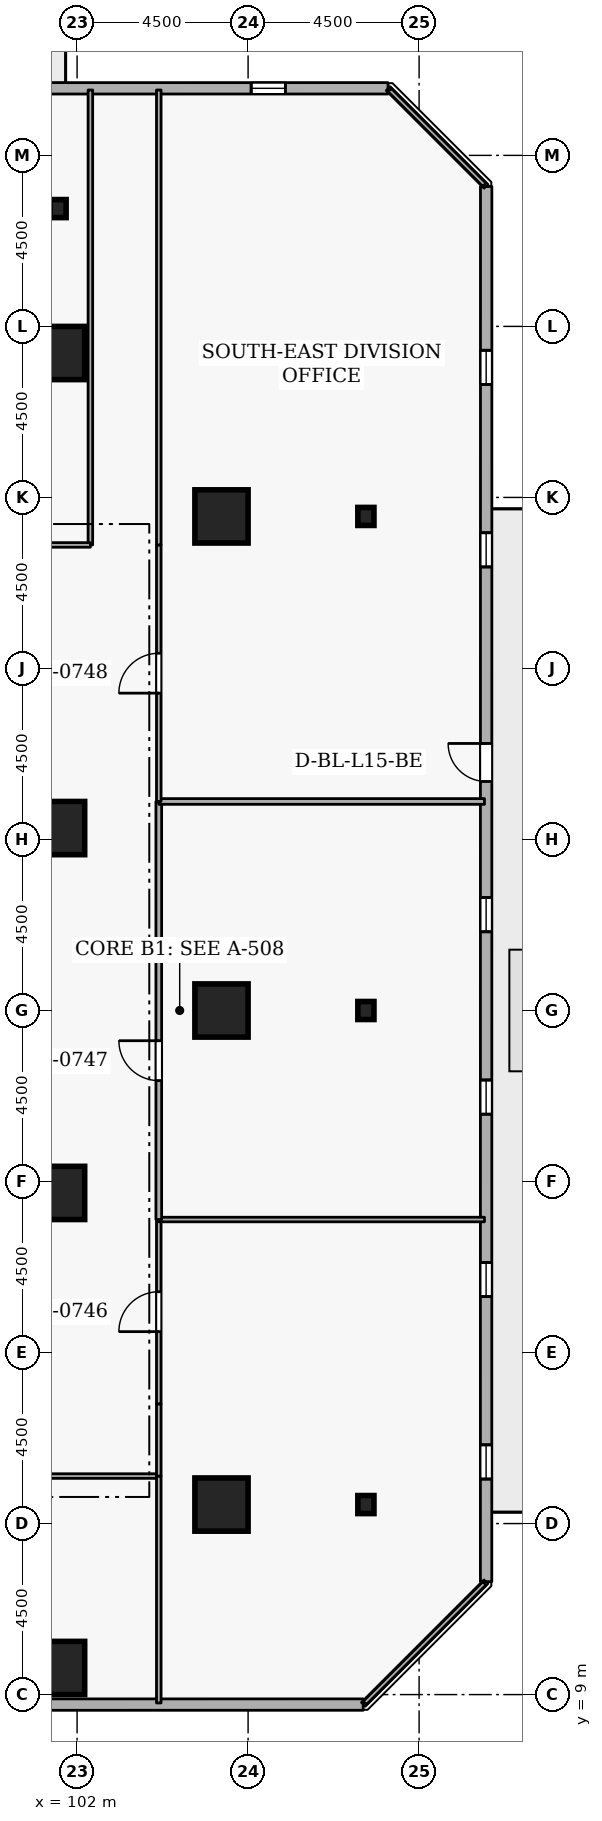
"""IFC4 building model, lengths in metres.
Left out: names, types, materials, properties, quantities, classifications, styles, units other than length and angle.
Written with IfcOpenShell. Run it as: python <this file> out.ifc"""

import sys

from ifc_helpers import new_model, si_unit, direction, frame, frame_2d, origin, origin_2d, place, context, subcontext, project, spatial, rectangle, i_section, extrude, element, fill, save


model = new_model("IFC4")
c1 = context("Model", 3, precision=1e-05, world=origin(), true_north=direction((0.0, 1.0)))
c2 = subcontext(c1, "Body", "Model", "MODEL_VIEW")
j1 = project(units=[si_unit("LENGTHUNIT", "METRE"), si_unit("PLANEANGLEUNIT", "RADIAN")], contexts=[c1])
p1 = place(None, origin())
s1 = spatial("IfcSite", under=j1, at=p1, CompositionType="ELEMENT")
p2 = place(p1, origin())
s2 = spatial("IfcBuilding", under=s1, at=p2, CompositionType="ELEMENT")
p3 = place(p2, frame((0.0, 0.0, 60.9)))
s3 = spatial("IfcBuildingStorey", under=s2, at=p3, CompositionType="ELEMENT", Elevation=60.9)
for number, where, z_axis, x_axis in (
    (1, (105.8, 14.0, 0.0), (0.0, 0.0, 1.0), (1.0, 0.0, 0.0)),
    (2, (105.8, 27.0, 0.0), (0.0, 0.0, 1.0), (1.0, 0.0, 0.0)),
    (3, (105.8, 40.0, 0.0), (0.0, 0.0, 1.0), (1.0, 0.0, 0.0)),
    (4, (101.5, 44.3, 0.0), (0.0, 0.0, 1.0), (1.0, 0.0, 0.0)),
    (5, (101.5, 9.7, 0.0), (0.0, 0.0, 1.0), (1.0, 0.0, 0.0)),
    (6, (101.5, 22.2, 0.0), (0.0, 0.0, 1.0), (1.0, 0.0, 0.0)),
    (7, (101.5, 31.8, 0.0), (0.0, 0.0, 1.0), (1.0, 0.0, 0.0)),
):
    element("IfcColumn", number, at=place(p3, frame(where, z_axis=z_axis, x_axis=x_axis)), inside=s3, PredefinedType="COLUMN", context=c2, shape_type="SweptSolid", body=[
        extrude(rectangle(XDim=1.4, YDim=1.4, at=origin_2d()), origin(), (0.0, 0.0, 1.0), 3.6),
    ])
for number, where, z_axis, x_axis in (
    (8, (109.6, 14.0, 0.0), (0.0, 0.0, 1.0), (1.0, 0.0, 0.0)),
    (9, (109.6, 27.0, 0.0), (0.0, 0.0, 1.0), (1.0, 0.0, 0.0)),
    (10, (109.6, 40.0, 0.0), (0.0, 0.0, 1.0), (1.0, 0.0, 0.0)),
    (11, (101.5, 48.1, 0.0), (0.0, 0.0, 1.0), (1.0, 0.0, 0.0)),
):
    element("IfcColumn", number, at=place(p3, frame(where, z_axis=z_axis, x_axis=x_axis)), inside=s3, PredefinedType="COLUMN", context=c2, shape_type="SweptSolid", body=[
        extrude(i_section(OverallWidth=0.424, OverallDepth=0.475, WebThickness=0.048, FlangeThickness=0.077, FilletRadius=0.015, at=origin_2d()), origin(), (0.0, 0.0, 1.0), 3.6),
    ])
p4 = place(p3, frame((72.819, 8.735, 0.0), z_axis=(0.0, 0.0, 1.0), x_axis=(0.999999998209, 5.985515e-05, 0.0)))
e12 = element("IfcWall", 12, at=p4, inside=s3, PredefinedType="STANDARD", context=c2, shape_type="SweptSolid", body=[
    extrude(rectangle(XDim=36.71, YDim=0.3, at=frame_2d((18.355, 0.0))), origin(), (0.0, 0.0, 1.0), 2.7),
])
p5 = place(p4, frame((7.5, 0.0, 0.72)))
e13 = element("IfcOpeningElement", 13, at=p5, cuts=e12, PredefinedType="OPENING", context=c2, shape_type="SweptSolid", body=[
    extrude(rectangle(XDim=0.9, YDim=1.75, at=frame_2d((0.45, 0.875))), frame((0.0, 0.16, 0.0), z_axis=(0.0, -1.0, 0.0), x_axis=(1.0, 0.0, 0.0)), (0.0, 0.0, 1.0), 0.32),
])
p6 = place(p4, frame((17.1, 0.0, 0.72)))
e14 = element("IfcOpeningElement", 14, at=p6, cuts=e12, PredefinedType="OPENING", context=c2, shape_type="SweptSolid", body=[
    extrude(rectangle(XDim=0.9, YDim=1.75, at=frame_2d((0.45, 0.875))), frame((0.0, 0.16, 0.0), z_axis=(0.0, -1.0, 0.0), x_axis=(1.0, 0.0, 0.0)), (0.0, 0.0, 1.0), 0.32),
])
p7 = place(p4, frame((21.9, 0.0, 0.72)))
e15 = element("IfcOpeningElement", 15, at=p7, cuts=e12, PredefinedType="OPENING", context=c2, shape_type="SweptSolid", body=[
    extrude(rectangle(XDim=0.9, YDim=1.75, at=frame_2d((0.45, 0.875))), frame((0.0, 0.16, 0.0), z_axis=(0.0, -1.0, 0.0), x_axis=(1.0, 0.0, 0.0)), (0.0, 0.0, 1.0), 0.32),
])
p8 = place(p4, frame((26.7, 0.0, 0.72)))
e16 = element("IfcOpeningElement", 16, at=p8, cuts=e12, PredefinedType="OPENING", context=c2, shape_type="SweptSolid", body=[
    extrude(rectangle(XDim=0.9, YDim=1.75, at=frame_2d((0.45, 0.875))), frame((0.0, 0.16, 0.0), z_axis=(0.0, -1.0, 0.0), x_axis=(1.0, 0.0, 0.0)), (0.0, 0.0, 1.0), 0.32),
])
p9 = place(p3, frame((112.763, 11.971, 0.0), z_axis=(0.0, 0.0, 1.0), x_axis=(5.985515e-05, 0.999999998209, 0.0)))
e17 = element("IfcWall", 17, at=p9, inside=s3, PredefinedType="STANDARD", context=c2, shape_type="SweptSolid", body=[
    extrude(rectangle(XDim=36.71, YDim=0.3, at=frame_2d((18.355, 0.0))), origin(), (0.0, 0.0, 1.0), 2.7),
])
p10 = place(p9, frame((21.055, 0.0, 0.0)))
e18 = element("IfcOpeningElement", 18, at=p10, cuts=e17, PredefinedType="OPENING", context=c2, shape_type="SweptSolid", body=[
    extrude(rectangle(XDim=1.0, YDim=2.08, at=frame_2d((0.5, 1.04))), frame((0.0, 0.16, 0.0), z_axis=(0.0, -1.0, 0.0), x_axis=(1.0, 0.0, 0.0)), (0.0, 0.0, 1.0), 0.32),
])
p11 = place(p9, frame((2.7, 0.0, 0.72)))
e19 = element("IfcOpeningElement", 19, at=p11, cuts=e17, PredefinedType="OPENING", context=c2, shape_type="SweptSolid", body=[
    extrude(rectangle(XDim=0.9, YDim=1.75, at=frame_2d((0.45, 0.875))), frame((0.0, 0.16, 0.0), z_axis=(0.0, -1.0, 0.0), x_axis=(1.0, 0.0, 0.0)), (0.0, 0.0, 1.0), 0.32),
])
p12 = place(p9, frame((7.5, 0.0, 0.72)))
e20 = element("IfcOpeningElement", 20, at=p12, cuts=e17, PredefinedType="OPENING", context=c2, shape_type="SweptSolid", body=[
    extrude(rectangle(XDim=0.9, YDim=1.75, at=frame_2d((0.45, 0.875))), frame((0.0, 0.16, 0.0), z_axis=(0.0, -1.0, 0.0), x_axis=(1.0, 0.0, 0.0)), (0.0, 0.0, 1.0), 0.32),
])
p13 = place(p9, frame((12.3, 0.0, 0.72)))
e21 = element("IfcOpeningElement", 21, at=p13, cuts=e17, PredefinedType="OPENING", context=c2, shape_type="SweptSolid", body=[
    extrude(rectangle(XDim=0.9, YDim=1.75, at=frame_2d((0.45, 0.875))), frame((0.0, 0.16, 0.0), z_axis=(0.0, -1.0, 0.0), x_axis=(1.0, 0.0, 0.0)), (0.0, 0.0, 1.0), 0.32),
])
p14 = place(p9, frame((17.1, 0.0, 0.72)))
e22 = element("IfcOpeningElement", 22, at=p14, cuts=e17, PredefinedType="OPENING", context=c2, shape_type="SweptSolid", body=[
    extrude(rectangle(XDim=0.9, YDim=1.75, at=frame_2d((0.45, 0.875))), frame((0.0, 0.16, 0.0), z_axis=(0.0, -1.0, 0.0), x_axis=(1.0, 0.0, 0.0)), (0.0, 0.0, 1.0), 0.32),
])
p15 = place(p9, frame((26.7, 0.0, 0.72)))
e23 = element("IfcOpeningElement", 23, at=p15, cuts=e17, PredefinedType="OPENING", context=c2, shape_type="SweptSolid", body=[
    extrude(rectangle(XDim=0.9, YDim=1.75, at=frame_2d((0.45, 0.875))), frame((0.0, 0.16, 0.0), z_axis=(0.0, -1.0, 0.0), x_axis=(1.0, 0.0, 0.0)), (0.0, 0.0, 1.0), 0.32),
])
p16 = place(p9, frame((31.5, 0.0, 0.72)))
e24 = element("IfcOpeningElement", 24, at=p16, cuts=e17, PredefinedType="OPENING", context=c2, shape_type="SweptSolid", body=[
    extrude(rectangle(XDim=0.9, YDim=1.75, at=frame_2d((0.45, 0.875))), frame((0.0, 0.16, 0.0), z_axis=(0.0, -1.0, 0.0), x_axis=(1.0, 0.0, 0.0)), (0.0, 0.0, 1.0), 0.32),
])
p17 = place(p3, frame((110.181, 51.265, 0.0), z_axis=(0.0, 0.0, 1.0), x_axis=(-0.999999998209, -5.985515e-05, 0.0)))
e25 = element("IfcWall", 25, at=p17, inside=s3, PredefinedType="STANDARD", context=c2, shape_type="SweptSolid", body=[
    extrude(rectangle(XDim=36.71, YDim=0.3, at=frame_2d((18.355, 0.0))), origin(), (0.0, 0.0, 1.0), 2.7),
])
p18 = place(p17, frame((20.155, 0.0, 0.0)))
e26 = element("IfcOpeningElement", 26, at=p18, cuts=e25, PredefinedType="OPENING", context=c2, shape_type="SweptSolid", body=[
    extrude(rectangle(XDim=1.0, YDim=2.08, at=frame_2d((0.5, 1.04))), frame((0.0, 0.16, 0.0), z_axis=(0.0, -1.0, 0.0), x_axis=(1.0, 0.0, 0.0)), (0.0, 0.0, 1.0), 0.32),
])
p19 = place(p17, frame((2.7, 0.0, 0.72)))
e27 = element("IfcOpeningElement", 27, at=p19, cuts=e25, PredefinedType="OPENING", context=c2, shape_type="SweptSolid", body=[
    extrude(rectangle(XDim=0.9, YDim=1.75, at=frame_2d((0.45, 0.875))), frame((0.0, 0.16, 0.0), z_axis=(0.0, -1.0, 0.0), x_axis=(1.0, 0.0, 0.0)), (0.0, 0.0, 1.0), 0.32),
])
p20 = place(p17, frame((12.3, 0.0, 0.72)))
e28 = element("IfcOpeningElement", 28, at=p20, cuts=e25, PredefinedType="OPENING", context=c2, shape_type="SweptSolid", body=[
    extrude(rectangle(XDim=0.9, YDim=1.75, at=frame_2d((0.45, 0.875))), frame((0.0, 0.16, 0.0), z_axis=(0.0, -1.0, 0.0), x_axis=(1.0, 0.0, 0.0)), (0.0, 0.0, 1.0), 0.32),
])
p21 = place(p17, frame((17.1, 0.0, 0.72)))
e29 = element("IfcOpeningElement", 29, at=p21, cuts=e25, PredefinedType="OPENING", context=c2, shape_type="SweptSolid", body=[
    extrude(rectangle(XDim=0.9, YDim=1.75, at=frame_2d((0.45, 0.875))), frame((0.0, 0.16, 0.0), z_axis=(0.0, -1.0, 0.0), x_axis=(1.0, 0.0, 0.0)), (0.0, 0.0, 1.0), 0.32),
])
p22 = place(p17, frame((26.7, 0.0, 0.72)))
e30 = element("IfcOpeningElement", 30, at=p22, cuts=e25, PredefinedType="OPENING", context=c2, shape_type="SweptSolid", body=[
    extrude(rectangle(XDim=0.9, YDim=1.75, at=frame_2d((0.45, 0.875))), frame((0.0, 0.16, 0.0), z_axis=(0.0, -1.0, 0.0), x_axis=(1.0, 0.0, 0.0)), (0.0, 0.0, 1.0), 0.32),
])
p23 = place(p17, frame((31.5, 0.0, 0.72)))
e31 = element("IfcOpeningElement", 31, at=p23, cuts=e25, PredefinedType="OPENING", context=c2, shape_type="SweptSolid", body=[
    extrude(rectangle(XDim=0.9, YDim=1.75, at=frame_2d((0.45, 0.875))), frame((0.0, 0.16, 0.0), z_axis=(0.0, -1.0, 0.0), x_axis=(1.0, 0.0, 0.0)), (0.0, 0.0, 1.0), 0.32),
])
p24 = place(p3, frame((94.8, 14.75, 0.0), z_axis=(0.0, 0.0, 1.0), x_axis=(1.0, 0.0, 0.0)))
e32 = element("IfcWall", 32, at=p24, inside=s3, PredefinedType="PARTITIONING", context=c2, shape_type="SweptSolid", body=[
    extrude(rectangle(XDim=9.35, YDim=0.12, at=frame_2d((4.675, 0.0))), origin(), (0.0, 0.0, 1.0), 3.34),
])
p25 = place(p24, frame((4.15, 0.0, 0.0)))
e33 = element("IfcOpeningElement", 33, at=p25, cuts=e32, PredefinedType="OPENING", context=c2, shape_type="SweptSolid", body=[
    extrude(rectangle(XDim=1.05, YDim=2.1, at=frame_2d((0.525, 1.05))), frame((0.0, 0.07, 0.0), z_axis=(0.0, -1.0, 0.0), x_axis=(1.0, 0.0, 0.0)), (0.0, 0.0, 1.0), 0.14),
])
p26 = place(p3, frame((104.15, 14.75, 0.0), z_axis=(0.0, 0.0, 1.0), x_axis=(0.0, -1.0, 0.0)))
e34 = element("IfcWall", 34, at=p26, inside=s3, PredefinedType="PARTITIONING", context=c2, shape_type="SweptSolid", body=[
    extrude(rectangle(XDim=5.97, YDim=0.12, at=frame_2d((2.985, 0.0))), origin(), (0.0, 0.0, 1.0), 3.34),
])
p27 = place(p3, frame((102.35, 51.22, 0.0), z_axis=(0.0, 0.0, 1.0), x_axis=(0.0, -1.0, 0.0)))
e35 = element("IfcWall", 35, at=p27, inside=s3, PredefinedType="PARTITIONING", context=c2, shape_type="SweptSolid", body=[
    extrude(rectangle(XDim=11.97, YDim=0.12, at=frame_2d((5.985, 0.0))), origin(), (0.0, 0.0, 1.0), 3.34),
])
p28 = place(p3, frame((102.35, 39.25, 0.0), z_axis=(0.0, 0.0, 1.0), x_axis=(-1.0, 0.0, 0.0)))
e36 = element("IfcWall", 36, at=p28, inside=s3, PredefinedType="PARTITIONING", context=c2, shape_type="SweptSolid", body=[
    extrude(rectangle(XDim=1.862, YDim=0.12, at=frame_2d((0.931, 0.0))), origin(), (0.0, 0.0, 1.0), 3.34),
])
p29 = place(p3, frame((104.15, 14.75, 0.0), z_axis=(0.0, 0.0, 1.0), x_axis=(0.0, 1.0, 0.0)))
e37 = element("IfcWall", 37, at=p29, inside=s3, PredefinedType="PARTITIONING", context=c2, shape_type="SweptSolid", body=[
    extrude(rectangle(XDim=1.9, YDim=0.12, at=frame_2d((0.95, 0.0))), origin(), (0.0, 0.0, 1.0), 3.34),
])
p30 = place(p3, frame((104.15, 16.65, 0.0), z_axis=(0.0, 0.0, 1.0), x_axis=(0.0, 1.0, 0.0)))
e38 = element("IfcWall", 38, at=p30, inside=s3, PredefinedType="PARTITIONING", context=c2, shape_type="SweptSolid", body=[
    extrude(rectangle(XDim=4.85, YDim=0.12, at=frame_2d((2.425, 0.0))), origin(), (0.0, 0.0, 1.0), 3.34),
])
p31 = place(p30, frame((1.9, 0.0, 0.0)))
e39 = element("IfcOpeningElement", 39, at=p31, cuts=e38, PredefinedType="OPENING", context=c2, shape_type="SweptSolid", body=[
    extrude(rectangle(XDim=1.05, YDim=2.1, at=frame_2d((0.525, 1.05))), frame((0.0, 0.07, 0.0), z_axis=(0.0, -1.0, 0.0), x_axis=(1.0, 0.0, 0.0)), (0.0, 0.0, 1.0), 0.14),
])
p32 = place(p3, frame((104.15, 21.5, 0.0), z_axis=(0.0, 0.0, 1.0), x_axis=(1.0, 0.0, 0.0)))
e40 = element("IfcWall", 40, at=p32, inside=s3, PredefinedType="PARTITIONING", context=c2, shape_type="SweptSolid", body=[
    extrude(rectangle(XDim=8.57, YDim=0.12, at=frame_2d((4.285, 0.0))), origin(), (0.0, 0.0, 1.0), 3.34),
])
p33 = place(p3, frame((112.72, 11.93, 0.0), z_axis=(0.0, 0.0, 1.0), x_axis=(-0.707106781187, -0.707106781187, 0.0)))
e41 = element("IfcWall", 41, at=p33, inside=s3, PredefinedType="PARTITIONING", context=c2, shape_type="SweptSolid", body=[
    extrude(rectangle(XDim=4.454, YDim=0.12, at=frame_2d((2.227, 0.0))), origin(), (0.0, 0.0, 1.0), 3.34),
])
p34 = place(p3, frame((104.15, 21.5, 0.0), z_axis=(0.0, 0.0, 1.0), x_axis=(0.0, 1.0, 0.0)))
e42 = element("IfcWall", 42, at=p34, inside=s3, PredefinedType="PARTITIONING", context=c2, shape_type="SweptSolid", body=[
    extrude(rectangle(XDim=11.0, YDim=0.15, at=frame_2d((5.5, 0.0))), origin(), (0.0, 0.0, 1.0), 3.34),
])
p35 = place(p34, frame((3.655, 0.0, 0.0)))
e43 = element("IfcOpeningElement", 43, at=p35, cuts=e42, PredefinedType="OPENING", context=c2, shape_type="SweptSolid", body=[
    extrude(rectangle(XDim=1.05, YDim=2.1, at=frame_2d((0.525, 1.05))), frame((0.0, 0.085, 0.0), z_axis=(0.0, -1.0, 0.0), x_axis=(1.0, 0.0, 0.0)), (0.0, 0.0, 1.0), 0.17),
])
p36 = place(p3, frame((104.15, 32.5, 0.0), z_axis=(0.0, 0.0, 1.0), x_axis=(1.0, 0.0, 0.0)))
e44 = element("IfcWall", 44, at=p36, inside=s3, PredefinedType="PARTITIONING", context=c2, shape_type="SweptSolid", body=[
    extrude(rectangle(XDim=8.57, YDim=0.15, at=frame_2d((4.285, 0.0))), origin(), (0.0, 0.0, 1.0), 3.34),
])
p37 = place(p3, frame((104.15, 32.5, 0.0), z_axis=(0.0, 0.0, 1.0), x_axis=(0.0, 1.0, 0.0)))
e45 = element("IfcWall", 45, at=p37, inside=s3, PredefinedType="PARTITIONING", context=c2, shape_type="SweptSolid", body=[
    extrude(rectangle(XDim=6.75, YDim=0.12, at=frame_2d((3.375, 0.0))), origin(), (0.0, 0.0, 1.0), 3.34),
])
p38 = place(p37, frame((2.85, 0.0, 0.0)))
e46 = element("IfcOpeningElement", 46, at=p38, cuts=e45, PredefinedType="OPENING", context=c2, shape_type="SweptSolid", body=[
    extrude(rectangle(XDim=1.05, YDim=2.1, at=frame_2d((0.525, 1.05))), frame((0.0, 0.07, 0.0), z_axis=(0.0, -1.0, 0.0), x_axis=(1.0, 0.0, 0.0)), (0.0, 0.0, 1.0), 0.14),
])
p39 = place(p3, frame((104.15, 39.25, 0.0), z_axis=(0.0, 0.0, 1.0), x_axis=(0.0, 1.0, 0.0)))
e47 = element("IfcWall", 47, at=p39, inside=s3, PredefinedType="PARTITIONING", context=c2, shape_type="SweptSolid", body=[
    extrude(rectangle(XDim=11.97, YDim=0.12, at=frame_2d((5.985, 0.0))), origin(), (0.0, 0.0, 1.0), 3.34),
])
p40 = place(p3, frame((110.225, 51.22, 0.0), z_axis=(0.0, 0.0, 1.0), x_axis=(0.707106781187, -0.707106781187, 0.0)))
e48 = element("IfcWall", 48, at=p40, inside=s3, PredefinedType="PARTITIONING", context=c2, shape_type="SweptSolid", body=[
    extrude(rectangle(XDim=3.528, YDim=0.12, at=frame_2d((1.764, 0.0))), origin(), (0.0, 0.0, 1.0), 3.34),
])
p41 = place(p10, origin())
e49 = element("IfcDoor", 49, at=p41, inside=s3, OperationType="SINGLE_SWING_RIGHT", PredefinedType="DOOR", context=c2, shape_type="SweptSolid", body=[
    extrude(rectangle(XDim=1.0, YDim=2.08, at=frame_2d((0.5, 1.04))), frame((0.0, 0.025, 0.0), z_axis=(0.0, -1.0, 0.0), x_axis=(1.0, 0.0, 0.0)), (0.0, 0.0, 1.0), 0.05),
])
fill(e18, e49)
p42 = place(p11, origin())
e50 = element("IfcWindow", 50, at=p42, inside=s3, PartitioningType="SINGLE_PANEL", PredefinedType="WINDOW", context=c2, shape_type="SweptSolid", body=[
    extrude(rectangle(XDim=0.9, YDim=1.75, at=frame_2d((0.45, 0.875))), frame((0.0, 0.03, 0.0), z_axis=(0.0, -1.0, 0.0), x_axis=(1.0, 0.0, 0.0)), (0.0, 0.0, 1.0), 0.06),
])
fill(e19, e50)
p43 = place(p12, origin())
e51 = element("IfcWindow", 51, at=p43, inside=s3, PartitioningType="SINGLE_PANEL", PredefinedType="WINDOW", context=c2, shape_type="SweptSolid", body=[
    extrude(rectangle(XDim=0.9, YDim=1.75, at=frame_2d((0.45, 0.875))), frame((0.0, 0.03, 0.0), z_axis=(0.0, -1.0, 0.0), x_axis=(1.0, 0.0, 0.0)), (0.0, 0.0, 1.0), 0.06),
])
fill(e20, e51)
p44 = place(p13, origin())
e52 = element("IfcWindow", 52, at=p44, inside=s3, PartitioningType="SINGLE_PANEL", PredefinedType="WINDOW", context=c2, shape_type="SweptSolid", body=[
    extrude(rectangle(XDim=0.9, YDim=1.75, at=frame_2d((0.45, 0.875))), frame((0.0, 0.03, 0.0), z_axis=(0.0, -1.0, 0.0), x_axis=(1.0, 0.0, 0.0)), (0.0, 0.0, 1.0), 0.06),
])
fill(e21, e52)
p45 = place(p14, origin())
e53 = element("IfcWindow", 53, at=p45, inside=s3, PartitioningType="SINGLE_PANEL", PredefinedType="WINDOW", context=c2, shape_type="SweptSolid", body=[
    extrude(rectangle(XDim=0.9, YDim=1.75, at=frame_2d((0.45, 0.875))), frame((0.0, 0.03, 0.0), z_axis=(0.0, -1.0, 0.0), x_axis=(1.0, 0.0, 0.0)), (0.0, 0.0, 1.0), 0.06),
])
fill(e22, e53)
p46 = place(p15, origin())
e54 = element("IfcWindow", 54, at=p46, inside=s3, PartitioningType="SINGLE_PANEL", PredefinedType="WINDOW", context=c2, shape_type="SweptSolid", body=[
    extrude(rectangle(XDim=0.9, YDim=1.75, at=frame_2d((0.45, 0.875))), frame((0.0, 0.03, 0.0), z_axis=(0.0, -1.0, 0.0), x_axis=(1.0, 0.0, 0.0)), (0.0, 0.0, 1.0), 0.06),
])
fill(e23, e54)
p47 = place(p16, origin())
e55 = element("IfcWindow", 55, at=p47, inside=s3, PartitioningType="SINGLE_PANEL", PredefinedType="WINDOW", context=c2, shape_type="SweptSolid", body=[
    extrude(rectangle(XDim=0.9, YDim=1.75, at=frame_2d((0.45, 0.875))), frame((0.0, 0.03, 0.0), z_axis=(0.0, -1.0, 0.0), x_axis=(1.0, 0.0, 0.0)), (0.0, 0.0, 1.0), 0.06),
])
fill(e24, e55)
p48 = place(p19, origin())
e56 = element("IfcWindow", 56, at=p48, inside=s3, PartitioningType="SINGLE_PANEL", PredefinedType="WINDOW", context=c2, shape_type="SweptSolid", body=[
    extrude(rectangle(XDim=0.9, YDim=1.75, at=frame_2d((0.45, 0.875))), frame((0.0, 0.03, 0.0), z_axis=(0.0, -1.0, 0.0), x_axis=(1.0, 0.0, 0.0)), (0.0, 0.0, 1.0), 0.06),
])
fill(e27, e56)
p49 = place(p31, origin())
e57 = element("IfcDoor", 57, at=p49, inside=s3, OperationType="SINGLE_SWING_LEFT", PredefinedType="DOOR", context=c2, shape_type="SweptSolid", body=[
    extrude(rectangle(XDim=1.05, YDim=2.1, at=frame_2d((0.525, 1.05))), frame((0.0, 0.025, 0.0), z_axis=(0.0, -1.0, 0.0), x_axis=(1.0, 0.0, 0.0)), (0.0, 0.0, 1.0), 0.05),
])
fill(e39, e57)
p50 = place(p35, origin())
e58 = element("IfcDoor", 58, at=p50, inside=s3, OperationType="SINGLE_SWING_RIGHT", PredefinedType="DOOR", context=c2, shape_type="SweptSolid", body=[
    extrude(rectangle(XDim=1.05, YDim=2.1, at=frame_2d((0.525, 1.05))), frame((0.0, 0.025, 0.0), z_axis=(0.0, -1.0, 0.0), x_axis=(1.0, 0.0, 0.0)), (0.0, 0.0, 1.0), 0.05),
])
fill(e43, e58)
p51 = place(p38, origin())
e59 = element("IfcDoor", 59, at=p51, inside=s3, OperationType="SINGLE_SWING_LEFT", PredefinedType="DOOR", context=c2, shape_type="SweptSolid", body=[
    extrude(rectangle(XDim=1.05, YDim=2.1, at=frame_2d((0.525, 1.05))), frame((0.0, 0.025, 0.0), z_axis=(0.0, -1.0, 0.0), x_axis=(1.0, 0.0, 0.0)), (0.0, 0.0, 1.0), 0.05),
])
fill(e46, e59)
save(model, sys.argv[1])
